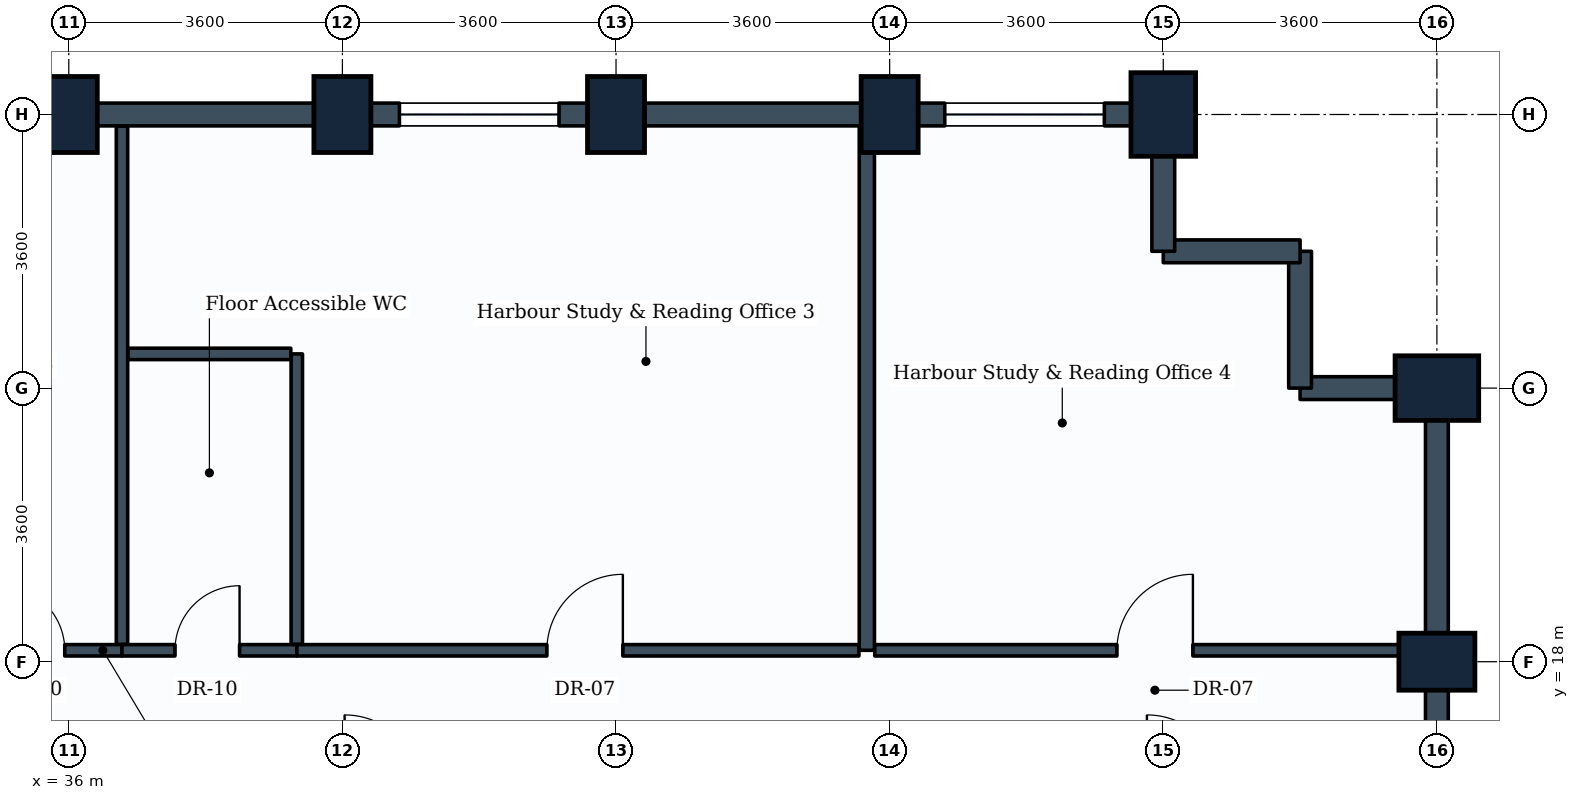
"""IFC4 building model, lengths in metres.
Left out: names, types, materials, properties, quantities, classifications, styles, units other than length and angle.
Written with IfcOpenShell. Run it as: python <this file> out.ifc"""

import sys

from ifc_helpers import new_model, si_unit, direction, frame, frame_2d, origin, origin_2d, place, context, subcontext, project, spatial, rectangle, extrude, element, fill, save


model = new_model("IFC4")
c1 = context("Model", 3, precision=1e-05, world=origin(), true_north=direction((0.0, 1.0)))
c2 = subcontext(c1, "Body", "Model", "MODEL_VIEW")
j1 = project(units=[si_unit("LENGTHUNIT", "METRE"), si_unit("PLANEANGLEUNIT", "RADIAN")], contexts=[c1])
p1 = place(None, origin())
s1 = spatial("IfcSite", under=j1, at=p1, CompositionType="ELEMENT")
p2 = place(p1, origin())
s2 = spatial("IfcBuilding", under=s1, at=p2, CompositionType="ELEMENT")
p3 = place(p2, frame((0.0, 0.0, 154.2)))
s3 = spatial("IfcBuildingStorey", under=s2, at=p3, CompositionType="ELEMENT", Elevation=154.2)
for number, where, z_axis, x_axis in (
    (1, (36.0, 25.2, 0.0), (0.0, 0.0, 1.0), (1.0, 0.0, 0.0)),
    (2, (39.6, 25.2, 0.0), (0.0, 0.0, 1.0), (1.0, 0.0, 0.0)),
    (3, (43.2, 25.2, 0.0), (0.0, 0.0, 1.0), (1.0, 0.0, 0.0)),
    (4, (46.8, 25.2, 0.0), (0.0, 0.0, 1.0), (1.0, 0.0, 0.0)),
):
    element("IfcColumn", number, at=place(p3, frame(where, z_axis=z_axis, x_axis=x_axis)), inside=s3, PredefinedType="COLUMN", context=c2, shape_type="SweptSolid", body=[
        extrude(rectangle(XDim=0.75, YDim=1.0, at=origin_2d()), origin(), (0.0, 0.0, 1.0), 3.8),
    ])
p4 = place(p3, frame((50.4, 25.2, 0.0), z_axis=(0.0, 0.0, 1.0), x_axis=(1.0, 0.0, 0.0)))
e5 = element("IfcColumn", 5, at=p4, inside=s3, PredefinedType="COLUMN", context=c2, shape_type="SweptSolid", body=[
    extrude(rectangle(XDim=0.85, YDim=1.1, at=origin_2d()), origin(), (0.0, 0.0, 1.0), 3.8),
])
p5 = place(p3, frame((54.0, 18.0, 0.0), z_axis=(0.0, 0.0, 1.0), x_axis=(0.0, 1.0, 0.0)))
e6 = element("IfcColumn", 6, at=p5, inside=s3, PredefinedType="COLUMN", context=c2, shape_type="SweptSolid", body=[
    extrude(rectangle(XDim=0.75, YDim=1.0, at=origin_2d()), origin(), (0.0, 0.0, 1.0), 3.8),
])
p6 = place(p3, frame((54.0, 21.6, 0.0), z_axis=(0.0, 0.0, 1.0), x_axis=(0.0, 1.0, 0.0)))
e7 = element("IfcColumn", 7, at=p6, inside=s3, PredefinedType="COLUMN", context=c2, shape_type="SweptSolid", body=[
    extrude(rectangle(XDim=0.85, YDim=1.1, at=origin_2d()), origin(), (0.0, 0.0, 1.0), 3.8),
])
for number, where, z_axis, x_axis in (
    (8, (54.0, 18.0, 0.0), (0.0, 0.0, 1.0), (0.0, -1.0, 0.0)),
    (9, (54.0, 21.6, 0.0), (0.0, 0.0, 1.0), (0.0, -1.0, 0.0)),
):
    element("IfcWall", number, at=place(p3, frame(where, z_axis=z_axis, x_axis=x_axis)), inside=s3, PredefinedType="STANDARD", context=c2, shape_type="SweptSolid", body=[
        extrude(rectangle(XDim=3.6, YDim=0.3, at=frame_2d((1.8, 0.0))), origin(), (0.0, 0.0, 1.0), 2.93),
    ])
p7 = place(p3, frame((52.2, 21.6, 0.0), z_axis=(0.0, 0.0, 1.0), x_axis=(1.0, 0.0, 0.0)))
e10 = element("IfcWall", 10, at=p7, inside=s3, PredefinedType="STANDARD", context=c2, shape_type="SweptSolid", body=[
    extrude(rectangle(XDim=1.8, YDim=0.3, at=frame_2d((0.9, 0.0))), origin(), (0.0, 0.0, 1.0), 2.93),
])
p8 = place(p3, frame((52.2, 23.4, 0.0), z_axis=(0.0, 0.0, 1.0), x_axis=(0.0, -1.0, 0.0)))
e11 = element("IfcWall", 11, at=p8, inside=s3, PredefinedType="STANDARD", context=c2, shape_type="SweptSolid", body=[
    extrude(rectangle(XDim=1.8, YDim=0.3, at=frame_2d((0.9, 0.0))), origin(), (0.0, 0.0, 1.0), 3.535),
])
p9 = place(p3, frame((50.4, 23.4, 0.0), z_axis=(0.0, 0.0, 1.0), x_axis=(1.0, 0.0, 0.0)))
e12 = element("IfcWall", 12, at=p9, inside=s3, PredefinedType="STANDARD", context=c2, shape_type="SweptSolid", body=[
    extrude(rectangle(XDim=1.8, YDim=0.3, at=frame_2d((0.9, 0.0))), origin(), (0.0, 0.0, 1.0), 3.535),
])
p10 = place(p3, frame((50.4, 25.2, 0.0), z_axis=(0.0, 0.0, 1.0), x_axis=(0.0, -1.0, 0.0)))
e13 = element("IfcWall", 13, at=p10, inside=s3, PredefinedType="STANDARD", context=c2, shape_type="SweptSolid", body=[
    extrude(rectangle(XDim=1.8, YDim=0.3, at=frame_2d((0.9, 0.0))), origin(), (0.0, 0.0, 1.0), 2.93),
])
p11 = place(p3, frame((46.8, 25.2, 0.0), z_axis=(0.0, 0.0, 1.0), x_axis=(1.0, 0.0, 0.0)))
e14 = element("IfcWall", 14, at=p11, inside=s3, PredefinedType="STANDARD", context=c2, shape_type="SweptSolid", body=[
    extrude(rectangle(XDim=3.6, YDim=0.3, at=frame_2d((1.8, 0.0))), origin(), (0.0, 0.0, 1.0), 2.93),
])
p12 = place(p11, frame((0.725, 0.0, 0.85)))
e15 = element("IfcOpeningElement", 15, at=p12, cuts=e14, PredefinedType="OPENING", context=c2, shape_type="SweptSolid", body=[
    extrude(rectangle(XDim=2.1, YDim=1.35, at=frame_2d((1.05, 0.675))), frame((0.0, 0.16, 0.0), z_axis=(0.0, -1.0, 0.0), x_axis=(1.0, 0.0, 0.0)), (0.0, 0.0, 1.0), 0.32),
])
p13 = place(p3, frame((43.2, 25.2, 0.0), z_axis=(0.0, 0.0, 1.0), x_axis=(1.0, 0.0, 0.0)))
e16 = element("IfcWall", 16, at=p13, inside=s3, PredefinedType="STANDARD", context=c2, shape_type="SweptSolid", body=[
    extrude(rectangle(XDim=3.6, YDim=0.3, at=frame_2d((1.8, 0.0))), origin(), (0.0, 0.0, 1.0), 2.93),
])
p14 = place(p3, frame((39.6, 25.2, 0.0), z_axis=(0.0, 0.0, 1.0), x_axis=(1.0, 0.0, 0.0)))
e17 = element("IfcWall", 17, at=p14, inside=s3, PredefinedType="STANDARD", context=c2, shape_type="SweptSolid", body=[
    extrude(rectangle(XDim=3.6, YDim=0.3, at=frame_2d((1.8, 0.0))), origin(), (0.0, 0.0, 1.0), 2.93),
])
p15 = place(p14, frame((0.75, 0.0, 0.85)))
e18 = element("IfcOpeningElement", 18, at=p15, cuts=e17, PredefinedType="OPENING", context=c2, shape_type="SweptSolid", body=[
    extrude(rectangle(XDim=2.1, YDim=1.35, at=frame_2d((1.05, 0.675))), frame((0.0, 0.16, 0.0), z_axis=(0.0, -1.0, 0.0), x_axis=(1.0, 0.0, 0.0)), (0.0, 0.0, 1.0), 0.32),
])
for number, where, z_axis, x_axis in (
    (19, (36.0, 25.2, 0.0), (0.0, 0.0, 1.0), (1.0, 0.0, 0.0)),
    (20, (32.4, 25.2, 0.0), (0.0, 0.0, 1.0), (1.0, 0.0, 0.0)),
):
    element("IfcWall", number, at=place(p3, frame(where, z_axis=z_axis, x_axis=x_axis)), inside=s3, PredefinedType="STANDARD", context=c2, shape_type="SweptSolid", body=[
        extrude(rectangle(XDim=3.6, YDim=0.3, at=frame_2d((1.8, 0.0))), origin(), (0.0, 0.0, 1.0), 2.93),
    ])
p16 = place(p3, frame((34.479, 18.15, 0.0), z_axis=(0.0, 0.0, 1.0), x_axis=(1.0, 0.0, 0.0)))
e21 = element("IfcWall", 21, at=p16, inside=s3, PredefinedType="PARTITIONING", context=c2, shape_type="SweptSolid", body=[
    extrude(rectangle(XDim=2.221, YDim=0.15, at=frame_2d((1.11, 0.0))), origin(), (0.0, 0.0, 1.0), 3.17),
])
p17 = place(p16, frame((0.618, 0.0, 0.0)))
e22 = element("IfcOpeningElement", 22, at=p17, cuts=e21, PredefinedType="OPENING", context=c2, shape_type="SweptSolid", body=[
    extrude(rectangle(XDim=0.85, YDim=2.1, at=frame_2d((0.425, 1.05))), frame((0.0, 0.085, 0.0), z_axis=(0.0, -1.0, 0.0), x_axis=(1.0, 0.0, 0.0)), (0.0, 0.0, 1.0), 0.17),
])
p18 = place(p3, frame((36.7, 18.229, 0.0), z_axis=(0.0, 0.0, 1.0), x_axis=(0.0, 1.0, 0.0)))
e23 = element("IfcWall", 23, at=p18, inside=s3, PredefinedType="PARTITIONING", context=c2, shape_type="SweptSolid", body=[
    extrude(rectangle(XDim=6.817, YDim=0.15, at=frame_2d((3.408, 0.0))), origin(), (0.0, 0.0, 1.0), 2.93),
])
p19 = place(p3, frame((36.7, 18.15, 0.0), z_axis=(0.0, 0.0, 1.0), x_axis=(1.0, 0.0, 0.0)))
e24 = element("IfcWall", 24, at=p19, inside=s3, PredefinedType="PARTITIONING", context=c2, shape_type="SweptSolid", body=[
    extrude(rectangle(XDim=2.3, YDim=0.15, at=frame_2d((1.15, 0.0))), origin(), (0.0, 0.0, 1.0), 3.17),
])
p20 = place(p19, frame((0.697, 0.0, 0.0)))
e25 = element("IfcOpeningElement", 25, at=p20, cuts=e24, PredefinedType="OPENING", context=c2, shape_type="SweptSolid", body=[
    extrude(rectangle(XDim=0.85, YDim=2.1, at=frame_2d((0.425, 1.05))), frame((0.0, 0.085, 0.0), z_axis=(0.0, -1.0, 0.0), x_axis=(1.0, 0.0, 0.0)), (0.0, 0.0, 1.0), 0.17),
])
p21 = place(p3, frame((39.0, 18.229, 0.0), z_axis=(0.0, 0.0, 1.0), x_axis=(0.0, 1.0, 0.0)))
e26 = element("IfcWall", 26, at=p21, inside=s3, PredefinedType="PARTITIONING", context=c2, shape_type="SweptSolid", body=[
    extrude(rectangle(XDim=3.821, YDim=0.15, at=frame_2d((1.911, 0.0))), origin(), (0.0, 0.0, 1.0), 3.17),
])
p22 = place(p3, frame((36.779, 22.05, 0.0), z_axis=(0.0, 0.0, 1.0), x_axis=(1.0, 0.0, 0.0)))
e27 = element("IfcWall", 27, at=p22, inside=s3, PredefinedType="PARTITIONING", context=c2, shape_type="SweptSolid", body=[
    extrude(rectangle(XDim=2.142, YDim=0.15, at=frame_2d((1.071, 0.0))), origin(), (0.0, 0.0, 1.0), 3.535),
])
p23 = place(p3, frame((46.5, 18.15, 0.0), z_axis=(0.0, 0.0, 1.0), x_axis=(0.0, 1.0, 0.0)))
e28 = element("IfcWall", 28, at=p23, inside=s3, PredefinedType="PARTITIONING", context=c2, shape_type="SweptSolid", body=[
    extrude(rectangle(XDim=6.896, YDim=0.2, at=frame_2d((3.448, 0.0))), origin(), (0.0, 0.0, 1.0), 2.93),
])
p24 = place(p3, frame((39.0, 18.15, 0.0), z_axis=(0.0, 0.0, 1.0), x_axis=(1.0, 0.0, 0.0)))
e29 = element("IfcWall", 29, at=p24, inside=s3, PredefinedType="PARTITIONING", context=c2, shape_type="SweptSolid", body=[
    extrude(rectangle(XDim=7.396, YDim=0.15, at=frame_2d((3.698, 0.0))), origin(), (0.0, 0.0, 1.0), 3.17),
])
p25 = place(p24, frame((3.29, 0.0, 0.0)))
e30 = element("IfcOpeningElement", 30, at=p25, cuts=e29, PredefinedType="OPENING", context=c2, shape_type="SweptSolid", body=[
    extrude(rectangle(XDim=1.0, YDim=2.1, at=frame_2d((0.5, 1.05))), frame((0.0, 0.085, 0.0), z_axis=(0.0, -1.0, 0.0), x_axis=(1.0, 0.0, 0.0)), (0.0, 0.0, 1.0), 0.17),
])
p26 = place(p3, frame((46.604, 18.15, 0.0), z_axis=(0.0, 0.0, 1.0), x_axis=(1.0, 0.0, 0.0)))
e31 = element("IfcWall", 31, at=p26, inside=s3, PredefinedType="PARTITIONING", context=c2, shape_type="SweptSolid", body=[
    extrude(rectangle(XDim=7.242, YDim=0.15, at=frame_2d((3.621, 0.0))), origin(), (0.0, 0.0, 1.0), 2.93),
])
p27 = place(p26, frame((3.186, 0.0, 0.0)))
e32 = element("IfcOpeningElement", 32, at=p27, cuts=e31, PredefinedType="OPENING", context=c2, shape_type="SweptSolid", body=[
    extrude(rectangle(XDim=1.0, YDim=2.1, at=frame_2d((0.5, 1.05))), frame((0.0, 0.085, 0.0), z_axis=(0.0, -1.0, 0.0), x_axis=(1.0, 0.0, 0.0)), (0.0, 0.0, 1.0), 0.17),
])
p28 = place(p12, origin())
e33 = element("IfcWindow", 33, at=p28, inside=s3, PartitioningType="SINGLE_PANEL", PredefinedType="WINDOW", context=c2, shape_type="SweptSolid", body=[
    extrude(rectangle(XDim=2.1, YDim=1.35, at=frame_2d((1.05, 0.675))), frame((0.0, 0.03, 0.0), z_axis=(0.0, -1.0, 0.0), x_axis=(1.0, 0.0, 0.0)), (0.0, 0.0, 1.0), 0.06),
])
fill(e15, e33)
p29 = place(p15, origin())
e34 = element("IfcWindow", 34, at=p29, inside=s3, PartitioningType="SINGLE_PANEL", PredefinedType="WINDOW", context=c2, shape_type="SweptSolid", body=[
    extrude(rectangle(XDim=2.1, YDim=1.35, at=frame_2d((1.05, 0.675))), frame((0.0, 0.03, 0.0), z_axis=(0.0, -1.0, 0.0), x_axis=(1.0, 0.0, 0.0)), (0.0, 0.0, 1.0), 0.06),
])
fill(e18, e34)
p30 = place(p17, origin())
e35 = element("IfcDoor", 35, at=p30, inside=s3, OperationType="SINGLE_SWING_LEFT", PredefinedType="DOOR", context=c2, shape_type="SweptSolid", body=[
    extrude(rectangle(XDim=0.85, YDim=2.1, at=frame_2d((0.425, 1.05))), frame((0.0, 0.025, 0.0), z_axis=(0.0, -1.0, 0.0), x_axis=(1.0, 0.0, 0.0)), (0.0, 0.0, 1.0), 0.05),
])
fill(e22, e35)
p31 = place(p20, origin())
e36 = element("IfcDoor", 36, at=p31, inside=s3, OperationType="SINGLE_SWING_RIGHT", PredefinedType="DOOR", context=c2, shape_type="SweptSolid", body=[
    extrude(rectangle(XDim=0.85, YDim=2.1, at=frame_2d((0.425, 1.05))), frame((0.0, 0.025, 0.0), z_axis=(0.0, -1.0, 0.0), x_axis=(1.0, 0.0, 0.0)), (0.0, 0.0, 1.0), 0.05),
])
fill(e25, e36)
p32 = place(p25, origin())
e37 = element("IfcDoor", 37, at=p32, inside=s3, OperationType="SINGLE_SWING_RIGHT", PredefinedType="DOOR", context=c2, shape_type="SweptSolid", body=[
    extrude(rectangle(XDim=1.0, YDim=2.1, at=frame_2d((0.5, 1.05))), frame((0.0, 0.025, 0.0), z_axis=(0.0, -1.0, 0.0), x_axis=(1.0, 0.0, 0.0)), (0.0, 0.0, 1.0), 0.05),
])
fill(e30, e37)
p33 = place(p27, origin())
e38 = element("IfcDoor", 38, at=p33, inside=s3, OperationType="SINGLE_SWING_RIGHT", PredefinedType="DOOR", context=c2, shape_type="SweptSolid", body=[
    extrude(rectangle(XDim=1.0, YDim=2.1, at=frame_2d((0.5, 1.05))), frame((0.0, 0.025, 0.0), z_axis=(0.0, -1.0, 0.0), x_axis=(1.0, 0.0, 0.0)), (0.0, 0.0, 1.0), 0.05),
])
fill(e32, e38)
save(model, sys.argv[1])
